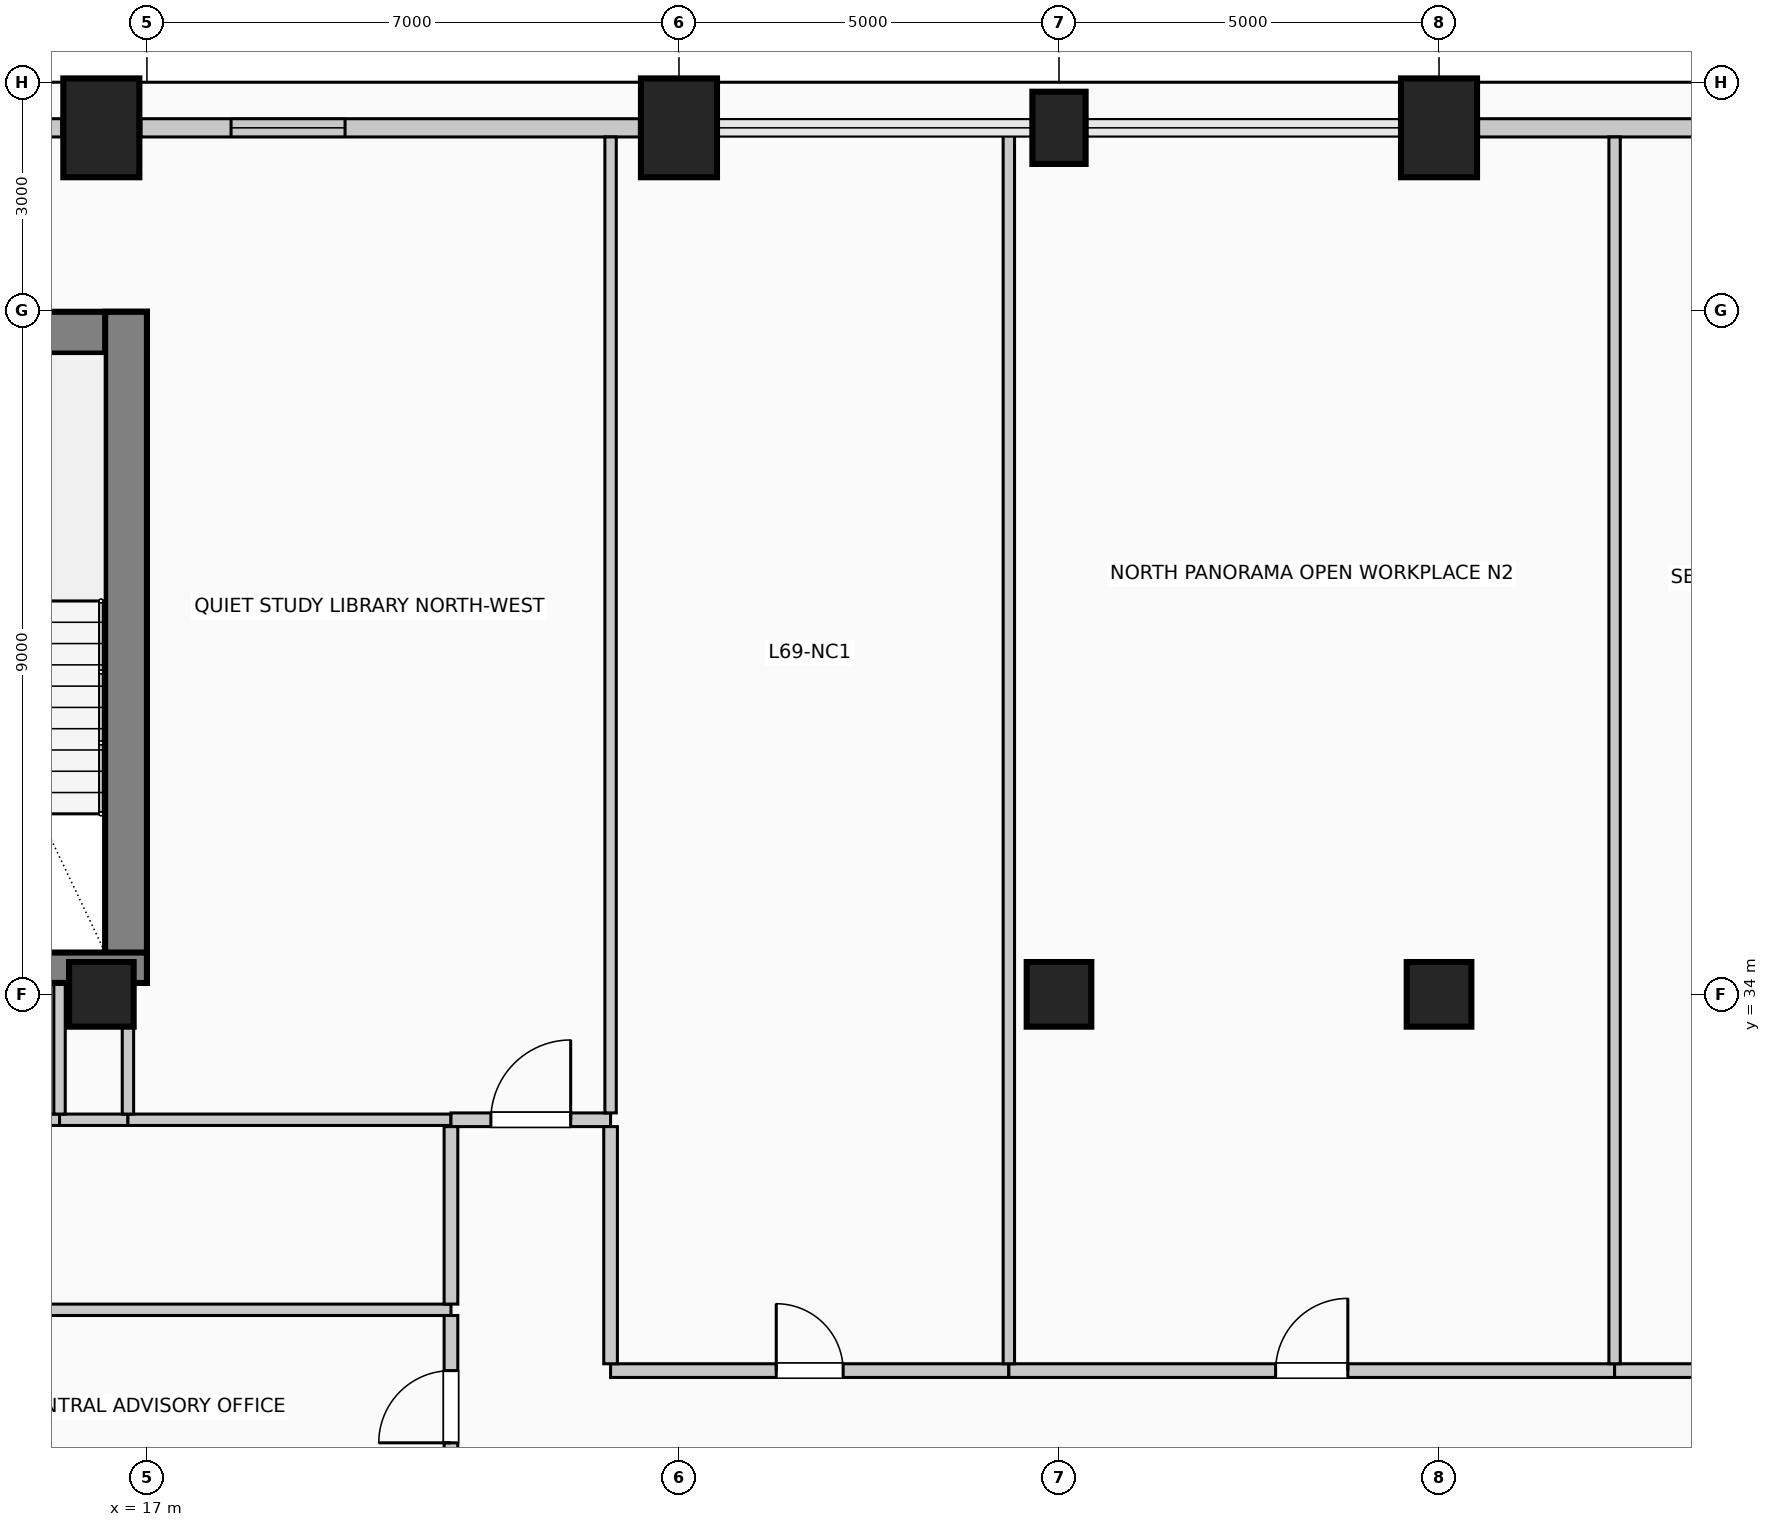
"""IFC4 building model, lengths in metres.
Left out: names, types, materials, properties, quantities, classifications, styles, units other than length and angle.
Written with IfcOpenShell. Run it as: python <this file> out.ifc"""

import sys

from ifc_helpers import new_model, si_unit, direction, frame, frame_2d, origin, origin_2d, place, context, subcontext, project, spatial, rectangle, circle, extrude, element, fill, save


model = new_model("IFC4")
c1 = context("Model", 3, precision=1e-05, world=origin(), true_north=direction((0.0, 1.0)))
c2 = subcontext(c1, "Body", "Model", "MODEL_VIEW")
j1 = project(units=[si_unit("LENGTHUNIT", "METRE"), si_unit("PLANEANGLEUNIT", "RADIAN")], contexts=[c1])
p1 = place(None, origin())
s1 = spatial("IfcSite", under=j1, at=p1, CompositionType="ELEMENT")
p2 = place(p1, origin())
s2 = spatial("IfcBuilding", under=s1, at=p2, CompositionType="ELEMENT")
p3 = place(p2, frame((0.0, 0.0, 285.0)))
s3 = spatial("IfcBuildingStorey", under=s2, at=p3, CompositionType="ELEMENT", Elevation=285.0)
p4 = place(p3, frame((3.0, 42.705, 0.0), z_axis=(0.0, 0.0, 1.0), x_axis=(1.0, 0.0, 0.0)))
e1 = element("IfcWall", 1, at=p4, inside=s3, PredefinedType="SHEAR", context=c2, shape_type="SweptSolid", body=[
    extrude(rectangle(XDim=14.0, YDim=0.55, at=frame_2d((7.0, 0.0))), origin(), (0.0, 0.0, 1.0), 4.0),
])
p5 = place(p3, frame((16.725, 34.15, 0.0), z_axis=(0.0, 0.0, 1.0), x_axis=(0.0, 1.0, 0.0)))
e2 = element("IfcWall", 2, at=p5, inside=s3, PredefinedType="SHEAR", context=c2, shape_type="SweptSolid", body=[
    extrude(rectangle(XDim=8.83, YDim=0.55, at=frame_2d((4.415, 0.0))), origin(), (0.0, 0.0, 1.0), 4.0),
])
p6 = place(p3, frame((12.29, 34.35, 0.0), z_axis=(0.0, 0.0, 1.0), x_axis=(1.0, 0.0, 0.0)))
e3 = element("IfcWall", 3, at=p6, inside=s3, PredefinedType="SHEAR", context=c2, shape_type="SweptSolid", body=[
    extrude(rectangle(XDim=4.71, YDim=0.4, at=frame_2d((2.355, 0.0))), origin(), (0.0, 0.0, 1.0), 4.0),
])
p7 = place(p6, frame((1.4, 0.0, 0.0)))
e4 = element("IfcOpeningElement", 4, at=p7, cuts=e3, PredefinedType="OPENING", context=c2, shape_type="SweptSolid", body=[
    extrude(rectangle(XDim=1.15, YDim=2.2, at=frame_2d((0.575, 1.1))), frame((0.0, 0.21, 0.0), z_axis=(0.0, -1.0, 0.0), x_axis=(1.0, 0.0, 0.0)), (0.0, 0.0, 1.0), 0.42),
])
for number, where, z_axis, x_axis in (
    (5, (16.4, 45.4, 0.0), (0.0, 0.0, 1.0), (1.0, 0.0, 0.0)),
    (6, (24.0, 45.4, 0.0), (0.0, 0.0, 1.0), (1.0, 0.0, 0.0)),
):
    element("IfcColumn", number, at=place(p3, frame(where, z_axis=z_axis, x_axis=x_axis)), inside=s3, PredefinedType="COLUMN", context=c2, shape_type="SweptSolid", body=[
        extrude(rectangle(XDim=1.0, YDim=1.3, at=origin_2d()), origin(), (0.0, 0.0, 1.0), 4.0),
    ])
p8 = place(p3, frame((29.0, 45.4, 0.0), z_axis=(0.0, 0.0, 1.0), x_axis=(1.0, 0.0, 0.0)))
e7 = element("IfcColumn", 7, at=p8, inside=s3, PredefinedType="COLUMN", context=c2, shape_type="SweptSolid", body=[
    extrude(rectangle(XDim=0.7, YDim=0.95, at=origin_2d()), origin(), (0.0, 0.0, 1.0), 4.0),
])
p9 = place(p3, frame((34.0, 45.4, 0.0), z_axis=(0.0, 0.0, 1.0), x_axis=(1.0, 0.0, 0.0)))
e8 = element("IfcColumn", 8, at=p9, inside=s3, PredefinedType="COLUMN", context=c2, shape_type="SweptSolid", body=[
    extrude(rectangle(XDim=1.0, YDim=1.3, at=origin_2d()), origin(), (0.0, 0.0, 1.0), 4.0),
])
for number, where, z_axis, x_axis in (
    (9, (16.4, 34.0, 0.0), (0.0, 0.0, 1.0), (1.0, 0.0, 0.0)),
    (10, (29.0, 34.0, 0.0), (0.0, 0.0, 1.0), (1.0, 0.0, 0.0)),
    (11, (34.0, 34.0, 0.0), (0.0, 0.0, 1.0), (1.0, 0.0, 0.0)),
):
    element("IfcColumn", number, at=place(p3, frame(where, z_axis=z_axis, x_axis=x_axis)), inside=s3, PredefinedType="COLUMN", context=c2, shape_type="SweptSolid", body=[
        extrude(circle(Radius=0.425, at=origin_2d()), origin(), (0.0, 0.0, 1.0), 4.0),
    ])
p10 = place(p3, frame((14.37, 45.4, 0.0), z_axis=(0.0, 0.0, 1.0), x_axis=(1.0, 0.0, 0.0)))
e12 = element("IfcWall", 12, at=p10, inside=s3, PredefinedType="SOLIDWALL", context=c2, shape_type="SweptSolid", body=[
    extrude(rectangle(XDim=1.51, YDim=0.24, at=frame_2d((0.755, 0.0))), origin(), (0.0, 0.0, 1.0), 3.025),
])
p11 = place(p3, frame((16.92, 45.4, 0.0), z_axis=(0.0, 0.0, 1.0), x_axis=(1.0, 0.0, 0.0)))
e13 = element("IfcWall", 13, at=p11, inside=s3, PredefinedType="SOLIDWALL", context=c2, shape_type="SweptSolid", body=[
    extrude(rectangle(XDim=6.56, YDim=0.24, at=frame_2d((3.28, 0.0))), origin(), (0.0, 0.0, 1.0), 3.025),
])
p12 = place(p11, frame((1.187, 0.0, 0.42)))
e14 = element("IfcOpeningElement", 14, at=p12, cuts=e13, PredefinedType="OPENING", context=c2, shape_type="SweptSolid", body=[
    extrude(rectangle(XDim=1.5, YDim=2.2, at=frame_2d((0.75, 1.1))), frame((0.0, 0.13, 0.0), z_axis=(0.0, -1.0, 0.0), x_axis=(1.0, 0.0, 0.0)), (0.0, 0.0, 1.0), 0.26),
])
p13 = place(p3, frame((34.52, 45.4, 0.0), z_axis=(0.0, 0.0, 1.0), x_axis=(1.0, 0.0, 0.0)))
e15 = element("IfcWall", 15, at=p13, inside=s3, PredefinedType="SOLIDWALL", context=c2, shape_type="SweptSolid", body=[
    extrude(rectangle(XDim=6.56, YDim=0.24, at=frame_2d((3.28, 0.0))), origin(), (0.0, 0.0, 1.0), 2.175),
])
p14 = place(p3, frame((23.1, 29.05, 0.0), z_axis=(0.0, 0.0, 1.0), x_axis=(1.0, 0.0, 0.0)))
e16 = element("IfcWall", 16, at=p14, inside=s3, PredefinedType="PARTITIONING", context=c2, shape_type="SweptSolid", body=[
    extrude(rectangle(XDim=5.24, YDim=0.18, at=frame_2d((2.62, 0.0))), origin(), (0.0, 0.0, 1.0), 3.775),
])
p15 = place(p14, frame((2.18, 0.0, 0.0)))
e17 = element("IfcOpeningElement", 17, at=p15, cuts=e16, PredefinedType="OPENING", context=c2, shape_type="SweptSolid", body=[
    extrude(rectangle(XDim=0.88, YDim=2.1, at=frame_2d((0.44, 1.05))), frame((0.0, 0.1, 0.0), z_axis=(0.0, -1.0, 0.0), x_axis=(1.0, 0.0, 0.0)), (0.0, 0.0, 1.0), 0.2),
])
p16 = place(p3, frame((28.34, 29.05, 0.0), z_axis=(0.0, 0.0, 1.0), x_axis=(1.0, 0.0, 0.0)))
e18 = element("IfcWall", 18, at=p16, inside=s3, PredefinedType="PARTITIONING", context=c2, shape_type="SweptSolid", body=[
    extrude(rectangle(XDim=7.97, YDim=0.18, at=frame_2d((3.985, 0.0))), origin(), (0.0, 0.0, 1.0), 3.775),
])
p17 = place(p16, frame((3.51, 0.0, 0.0)))
e19 = element("IfcOpeningElement", 19, at=p17, cuts=e18, PredefinedType="OPENING", context=c2, shape_type="SweptSolid", body=[
    extrude(rectangle(XDim=0.95, YDim=2.15, at=frame_2d((0.475, 1.075))), frame((0.0, 0.1, 0.0), z_axis=(0.0, -1.0, 0.0), x_axis=(1.0, 0.0, 0.0)), (0.0, 0.0, 1.0), 0.2),
])
p18 = place(p3, frame((36.31, 29.05, 0.0), z_axis=(0.0, 0.0, 1.0), x_axis=(1.0, 0.0, 0.0)))
e20 = element("IfcWall", 20, at=p18, inside=s3, PredefinedType="PARTITIONING", context=c2, shape_type="SweptSolid", body=[
    extrude(rectangle(XDim=5.24, YDim=0.18, at=frame_2d((2.62, 0.0))), origin(), (0.0, 0.0, 1.0), 3.775),
])
p19 = place(p18, frame((2.095, 0.0, 0.0)))
e21 = element("IfcOpeningElement", 21, at=p19, cuts=e20, PredefinedType="OPENING", context=c2, shape_type="SweptSolid", body=[
    extrude(rectangle(XDim=1.05, YDim=2.15, at=frame_2d((0.525, 1.075))), frame((0.0, 0.1, 0.0), z_axis=(0.0, -1.0, 0.0), x_axis=(1.0, 0.0, 0.0)), (0.0, 0.0, 1.0), 0.2),
])
p20 = place(p3, frame((12.33, 29.85, 0.0), z_axis=(0.0, 0.0, 1.0), x_axis=(1.0, 0.0, 0.0)))
e22 = element("IfcWall", 22, at=p20, inside=s3, PredefinedType="PARTITIONING", context=c2, shape_type="SweptSolid", body=[
    extrude(rectangle(XDim=8.67, YDim=0.15, at=frame_2d((4.335, 0.0))), origin(), (0.0, 0.0, 1.0), 3.775),
])
p21 = place(p3, frame((12.33, 32.35, 0.0), z_axis=(0.0, 0.0, 1.0), x_axis=(1.0, 0.0, 0.0)))
e23 = element("IfcWall", 23, at=p21, inside=s3, PredefinedType="PARTITIONING", context=c2, shape_type="SweptSolid", body=[
    extrude(rectangle(XDim=3.52, YDim=0.15, at=frame_2d((1.76, 0.0))), origin(), (0.0, 0.0, 1.0), 3.775),
])
p22 = place(p21, frame((1.285, 0.0, 0.0)))
e24 = element("IfcOpeningElement", 24, at=p22, cuts=e23, PredefinedType="OPENING", context=c2, shape_type="SweptSolid", body=[
    extrude(rectangle(XDim=0.95, YDim=2.15, at=frame_2d((0.475, 1.075))), frame((0.0, 0.085, 0.0), z_axis=(0.0, -1.0, 0.0), x_axis=(1.0, 0.0, 0.0)), (0.0, 0.0, 1.0), 0.17),
])
p23 = place(p3, frame((15.85, 32.35, 0.0), z_axis=(0.0, 0.0, 1.0), x_axis=(1.0, 0.0, 0.0)))
e25 = element("IfcWall", 25, at=p23, inside=s3, PredefinedType="PARTITIONING", context=c2, shape_type="SweptSolid", body=[
    extrude(rectangle(XDim=0.9, YDim=0.15, at=frame_2d((0.45, 0.0))), origin(), (0.0, 0.0, 1.0), 3.775),
])
p24 = place(p3, frame((16.75, 32.35, 0.0), z_axis=(0.0, 0.0, 1.0), x_axis=(1.0, 0.0, 0.0)))
e26 = element("IfcWall", 26, at=p24, inside=s3, PredefinedType="PARTITIONING", context=c2, shape_type="SweptSolid", body=[
    extrude(rectangle(XDim=4.25, YDim=0.15, at=frame_2d((2.125, 0.0))), origin(), (0.0, 0.0, 1.0), 3.775),
])
p25 = place(p3, frame((21.0, 32.35, 0.0), z_axis=(0.0, 0.0, 1.0), x_axis=(1.0, 0.0, 0.0)))
e27 = element("IfcWall", 27, at=p25, inside=s3, PredefinedType="PARTITIONING", context=c2, shape_type="SweptSolid", body=[
    extrude(rectangle(XDim=2.1, YDim=0.18, at=frame_2d((1.05, 0.0))), origin(), (0.0, 0.0, 1.0), 3.775),
])
p26 = place(p25, frame((0.525, 0.0, 0.0)))
e28 = element("IfcOpeningElement", 28, at=p26, cuts=e27, PredefinedType="OPENING", context=c2, shape_type="SweptSolid", body=[
    extrude(rectangle(XDim=1.05, YDim=2.15, at=frame_2d((0.525, 1.075))), frame((0.0, 0.1, 0.0), z_axis=(0.0, -1.0, 0.0), x_axis=(1.0, 0.0, 0.0)), (0.0, 0.0, 1.0), 0.2),
])
p27 = place(p3, frame((15.85, 32.425, 0.0), z_axis=(0.0, 0.0, 1.0), x_axis=(0.0, 1.0, 0.0)))
e29 = element("IfcWall", 29, at=p27, inside=s3, PredefinedType="PARTITIONING", context=c2, shape_type="SweptSolid", body=[
    extrude(rectangle(XDim=1.725, YDim=0.15, at=frame_2d((0.862, 0.0))), origin(), (0.0, 0.0, 1.0), 3.775),
])
p28 = place(p3, frame((16.75, 32.425, 0.0), z_axis=(0.0, 0.0, 1.0), x_axis=(0.0, 1.0, 0.0)))
e30 = element("IfcWall", 30, at=p28, inside=s3, PredefinedType="PARTITIONING", context=c2, shape_type="SweptSolid", body=[
    extrude(rectangle(XDim=1.15, YDim=0.15, at=frame_2d((0.575, 0.0))), origin(), (0.0, 0.0, 1.0), 3.775),
])
p29 = place(p3, frame((21.0, 27.375, 0.0), z_axis=(0.0, 0.0, 1.0), x_axis=(0.0, 1.0, 0.0)))
e31 = element("IfcWall", 31, at=p29, inside=s3, PredefinedType="PARTITIONING", context=c2, shape_type="SweptSolid", body=[
    extrude(rectangle(XDim=2.4, YDim=0.18, at=frame_2d((1.2, 0.0))), origin(), (0.0, 0.0, 1.0), 3.775),
])
p30 = place(p29, frame((0.725, 0.0, 0.0)))
e32 = element("IfcOpeningElement", 32, at=p30, cuts=e31, PredefinedType="OPENING", context=c2, shape_type="SweptSolid", body=[
    extrude(rectangle(XDim=0.95, YDim=2.15, at=frame_2d((0.475, 1.075))), frame((0.0, 0.1, 0.0), z_axis=(0.0, -1.0, 0.0), x_axis=(1.0, 0.0, 0.0)), (0.0, 0.0, 1.0), 0.2),
])
p31 = place(p3, frame((21.0, 29.925, 0.0), z_axis=(0.0, 0.0, 1.0), x_axis=(0.0, 1.0, 0.0)))
e33 = element("IfcWall", 33, at=p31, inside=s3, PredefinedType="PARTITIONING", context=c2, shape_type="SweptSolid", body=[
    extrude(rectangle(XDim=2.335, YDim=0.18, at=frame_2d((1.167, 0.0))), origin(), (0.0, 0.0, 1.0), 3.775),
])
p32 = place(p3, frame((23.1, 29.14, 0.0), z_axis=(0.0, 0.0, 1.0), x_axis=(0.0, 1.0, 0.0)))
e34 = element("IfcWall", 34, at=p32, inside=s3, PredefinedType="PARTITIONING", context=c2, shape_type="SweptSolid", body=[
    extrude(rectangle(XDim=3.12, YDim=0.18, at=frame_2d((1.56, 0.0))), origin(), (0.0, 0.0, 1.0), 3.775),
])
p33 = place(p3, frame((23.1, 32.44, 0.0), z_axis=(0.0, 0.0, 1.0), x_axis=(0.0, 1.0, 0.0)))
e35 = element("IfcWall", 35, at=p33, inside=s3, PredefinedType="PARTITIONING", context=c2, shape_type="SweptSolid", body=[
    extrude(rectangle(XDim=12.84, YDim=0.15, at=frame_2d((6.42, 0.0))), origin(), (0.0, 0.0, 1.0), 3.775),
])
p34 = place(p3, frame((28.34, 29.14, 0.0), z_axis=(0.0, 0.0, 1.0), x_axis=(0.0, 1.0, 0.0)))
e36 = element("IfcWall", 36, at=p34, inside=s3, PredefinedType="PARTITIONING", context=c2, shape_type="SweptSolid", body=[
    extrude(rectangle(XDim=16.26, YDim=0.15, at=frame_2d((8.13, 0.0))), origin(), (0.0, 0.0, 1.0), 3.775),
])
p35 = place(p3, frame((36.31, 29.14, 0.0), z_axis=(0.0, 0.0, 1.0), x_axis=(0.0, 1.0, 0.0)))
e37 = element("IfcWall", 37, at=p35, inside=s3, PredefinedType="PARTITIONING", context=c2, shape_type="SweptSolid", body=[
    extrude(rectangle(XDim=16.14, YDim=0.15, at=frame_2d((8.07, 0.0))), origin(), (0.0, 0.0, 1.0), 3.775),
])
p36 = place(p12, origin())
e38 = element("IfcWindow", 38, at=p36, inside=s3, PartitioningType="SINGLE_PANEL", PredefinedType="WINDOW", context=c2, shape_type="SweptSolid", body=[
    extrude(rectangle(XDim=1.5, YDim=2.2, at=frame_2d((0.75, 1.1))), frame((0.0, 0.03, 0.0), z_axis=(0.0, -1.0, 0.0), x_axis=(1.0, 0.0, 0.0)), (0.0, 0.0, 1.0), 0.06),
])
fill(e14, e38)
p37 = place(p15, origin())
e39 = element("IfcDoor", 39, at=p37, inside=s3, OperationType="SINGLE_SWING_LEFT", PredefinedType="DOOR", context=c2, shape_type="SweptSolid", body=[
    extrude(rectangle(XDim=0.88, YDim=2.1, at=frame_2d((0.44, 1.05))), frame((0.0, 0.025, 0.0), z_axis=(0.0, -1.0, 0.0), x_axis=(1.0, 0.0, 0.0)), (0.0, 0.0, 1.0), 0.05),
])
fill(e17, e39)
p38 = place(p17, origin())
e40 = element("IfcDoor", 40, at=p38, inside=s3, OperationType="SINGLE_SWING_RIGHT", PredefinedType="DOOR", context=c2, shape_type="SweptSolid", body=[
    extrude(rectangle(XDim=0.95, YDim=2.15, at=frame_2d((0.475, 1.075))), frame((0.0, 0.025, 0.0), z_axis=(0.0, -1.0, 0.0), x_axis=(1.0, 0.0, 0.0)), (0.0, 0.0, 1.0), 0.05),
])
fill(e19, e40)
p39 = place(p26, origin())
e41 = element("IfcDoor", 41, at=p39, inside=s3, OperationType="SINGLE_SWING_RIGHT", PredefinedType="DOOR", context=c2, shape_type="SweptSolid", body=[
    extrude(rectangle(XDim=1.05, YDim=2.15, at=frame_2d((0.525, 1.075))), frame((0.0, 0.025, 0.0), z_axis=(0.0, -1.0, 0.0), x_axis=(1.0, 0.0, 0.0)), (0.0, 0.0, 1.0), 0.05),
])
fill(e28, e41)
p40 = place(p30, origin())
e42 = element("IfcDoor", 42, at=p40, inside=s3, OperationType="SINGLE_SWING_LEFT", PredefinedType="DOOR", context=c2, shape_type="SweptSolid", body=[
    extrude(rectangle(XDim=0.95, YDim=2.15, at=frame_2d((0.475, 1.075))), frame((0.0, 0.025, 0.0), z_axis=(0.0, -1.0, 0.0), x_axis=(1.0, 0.0, 0.0)), (0.0, 0.0, 1.0), 0.05),
])
fill(e32, e42)
save(model, sys.argv[1])
